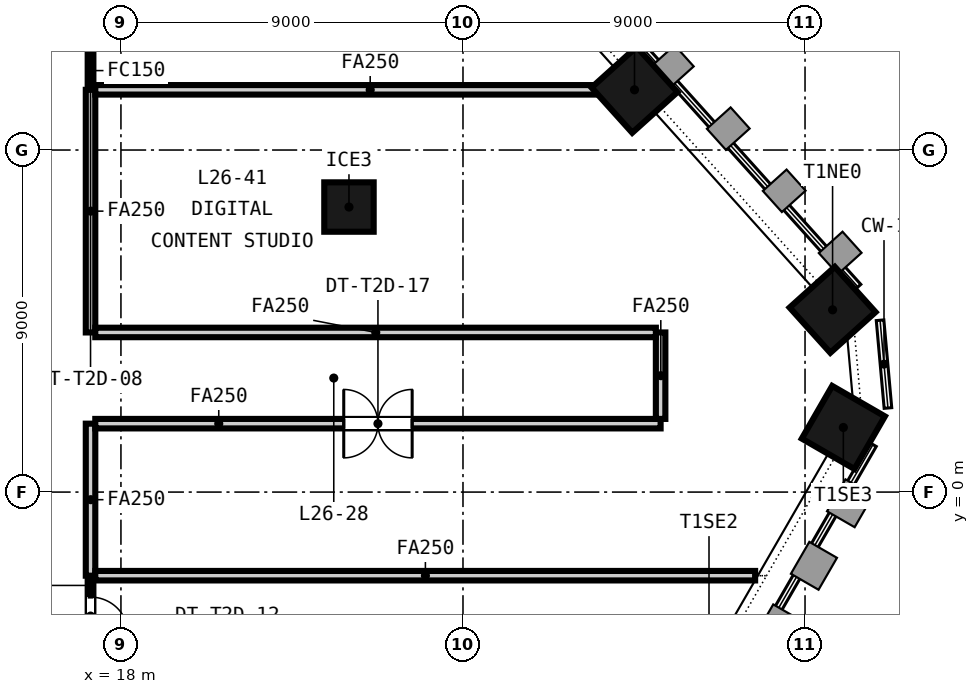
"""IFC4 building model, lengths in metres.
Left out: names, types, materials, properties, quantities, classifications, styles, units other than length and angle.
Written with IfcOpenShell. Run it as: python <this file> out.ifc"""

import sys

from ifc_helpers import new_model, si_unit, direction, frame, frame_2d, origin, origin_2d, place, context, subcontext, project, spatial, rectangle, extrude, element, fill, save


model = new_model("IFC4")
c1 = context("Model", 3, precision=1e-05, world=origin(), true_north=direction((0.0, 1.0)))
c2 = subcontext(c1, "Body", "Model", "MODEL_VIEW")
j1 = project(units=[si_unit("LENGTHUNIT", "METRE"), si_unit("PLANEANGLEUNIT", "RADIAN")], contexts=[c1])
p1 = place(None, origin())
s1 = spatial("IfcSite", under=j1, at=p1, CompositionType="ELEMENT")
p2 = place(p1, origin())
s2 = spatial("IfcBuilding", under=s1, at=p2, CompositionType="ELEMENT")
p3 = place(p2, frame((0.0, 0.0, 109.85)))
s3 = spatial("IfcBuildingStorey", under=s2, at=p3, CompositionType="ELEMENT", Elevation=109.85)
for number, where, z_axis, x_axis in (
    (1, (37.008, 1.7, -0.15), (0.0, 0.0, 1.0), (0.5, 0.866, 0.0)),
    (2, (36.725, 4.795, -0.15), (0.0, 0.0, 1.0), (-0.669, 0.743, 0.0)),
    (3, (31.513, 10.584, -0.15), (0.0, 0.0, 1.0), (-0.669, 0.743, 0.0)),
):
    element("IfcColumn", number, at=place(p3, frame(where, z_axis=z_axis, x_axis=x_axis)), inside=s3, PredefinedType="COLUMN", context=c2, shape_type="SweptSolid", body=[
        extrude(rectangle(XDim=1.6, YDim=1.6, at=origin_2d()), origin(), (0.0, 0.0, 1.0), 3.65),
    ])
p4 = place(p3, frame((24.0, 7.5, -0.15), z_axis=(0.0, 0.0, 1.0), x_axis=(1.0, 0.0, 0.0)))
e4 = element("IfcColumn", 4, at=p4, inside=s3, PredefinedType="COLUMN", context=c2, shape_type="SweptSolid", body=[
    extrude(rectangle(XDim=1.3, YDim=1.3, at=origin_2d()), origin(), (0.0, 0.0, 1.0), 3.65),
])
p5 = place(p3, frame((17.2, 13.709, 0.0), z_axis=(0.0, 0.0, 1.0), x_axis=(0.0, -1.0, 0.0)))
e5 = element("IfcWall", 5, at=p5, inside=s3, PredefinedType="PARTITIONING", context=c2, shape_type="SweptSolid", body=[
    extrude(rectangle(XDim=3.125, YDim=0.15, at=frame_2d((1.562, 0.0))), origin(), (0.0, 0.0, 1.0), 2.741),
])
p6 = place(p5, frame((1.062, 0.0, 0.0)))
e6 = element("IfcOpeningElement", 6, at=p6, cuts=e5, PredefinedType="OPENING", context=c2, shape_type="SweptSolid", body=[
    extrude(rectangle(XDim=1.0, YDim=2.1, at=frame_2d((0.5, 1.05))), frame((0.0, 0.085, 0.0), z_axis=(0.0, -1.0, 0.0), x_axis=(1.0, 0.0, 0.0)), (0.0, 0.0, 1.0), 0.17),
])
p7 = place(p3, frame((17.2, -2.2, 0.0), z_axis=(0.0, 0.0, 1.0), x_axis=(0.0, -1.0, 0.0)))
e7 = element("IfcWall", 7, at=p7, inside=s3, PredefinedType="PARTITIONING", context=c2, shape_type="SweptSolid", body=[
    extrude(rectangle(XDim=2.125, YDim=0.15, at=frame_2d((1.062, 0.0))), origin(), (0.0, 0.0, 1.0), 2.741),
])
p8 = place(p7, frame((0.562, 0.0, 0.0)))
e8 = element("IfcOpeningElement", 8, at=p8, cuts=e7, PredefinedType="OPENING", context=c2, shape_type="SweptSolid", body=[
    extrude(rectangle(XDim=1.0, YDim=2.1, at=frame_2d((0.5, 1.05))), frame((0.0, 0.085, 0.0), z_axis=(0.0, -1.0, 0.0), x_axis=(1.0, 0.0, 0.0)), (0.0, 0.0, 1.0), 0.17),
])
p9 = place(p3, frame((17.2, 1.8, 0.0), z_axis=(0.0, 0.0, 1.0), x_axis=(0.0, -1.0, 0.0)))
e9 = element("IfcWall", 9, at=p9, inside=s3, PredefinedType="PARTITIONING", context=c2, shape_type="SweptSolid", body=[
    extrude(rectangle(XDim=4.0, YDim=0.25, at=frame_2d((2.0, 0.0))), origin(), (0.0, 0.0, 1.0), 2.741),
])
p10 = place(p3, frame((32.2, 1.8, 0.0), z_axis=(0.0, 0.0, 1.0), x_axis=(-1.0, 0.0, 0.0)))
e10 = element("IfcWall", 10, at=p10, inside=s3, PredefinedType="PARTITIONING", context=c2, shape_type="SweptSolid", body=[
    extrude(rectangle(XDim=14.875, YDim=0.25, at=frame_2d((7.438, 0.0))), origin(), (0.0, 0.0, 1.0), 2.741),
])
p11 = place(p10, frame((6.538, 0.0, 0.0)))
e11 = element("IfcOpeningElement", 11, at=p11, cuts=e10, PredefinedType="OPENING", context=c2, shape_type="SweptSolid", body=[
    extrude(rectangle(XDim=1.8, YDim=2.1, at=frame_2d((0.9, 1.05))), frame((0.0, 0.135, 0.0), z_axis=(0.0, -1.0, 0.0), x_axis=(1.0, 0.0, 0.0)), (0.0, 0.0, 1.0), 0.27),
])
p12 = place(p3, frame((32.2, 4.2, 0.0), z_axis=(0.0, 0.0, 1.0), x_axis=(0.0, -1.0, 0.0)))
e12 = element("IfcWall", 12, at=p12, inside=s3, PredefinedType="PARTITIONING", context=c2, shape_type="SweptSolid", body=[
    extrude(rectangle(XDim=2.275, YDim=0.25, at=frame_2d((1.137, 0.0))), origin(), (0.0, 0.0, 1.0), 2.741),
])
p13 = place(p3, frame((17.2, 10.584, 0.0), z_axis=(0.0, 0.0, 1.0), x_axis=(0.0, -1.0, 0.0)))
e13 = element("IfcWall", 13, at=p13, inside=s3, PredefinedType="PARTITIONING", context=c2, shape_type="SweptSolid", body=[
    extrude(rectangle(XDim=6.384, YDim=0.25, at=frame_2d((3.192, 0.0))), origin(), (0.0, 0.0, 1.0), 2.741),
])
p14 = place(p3, frame((17.325, 10.584, 0.0), z_axis=(0.0, 0.0, 1.0), x_axis=(1.0, 0.0, 0.0)))
e14 = element("IfcWall", 14, at=p14, inside=s3, PredefinedType="PARTITIONING", context=c2, shape_type="SweptSolid", body=[
    extrude(rectangle(XDim=14.457, YDim=0.25, at=frame_2d((7.229, 0.0))), origin(), (0.0, 0.0, 1.0), 2.741),
])
p15 = place(p3, frame((17.325, 4.2, 0.0), z_axis=(0.0, 0.0, 1.0), x_axis=(1.0, 0.0, 0.0)))
e15 = element("IfcWall", 15, at=p15, inside=s3, PredefinedType="PARTITIONING", context=c2, shape_type="SweptSolid", body=[
    extrude(rectangle(XDim=14.75, YDim=0.25, at=frame_2d((7.375, 0.0))), origin(), (0.0, 0.0, 1.0), 2.741),
])
p16 = place(p3, frame((17.325, -2.2, 0.0), z_axis=(0.0, 0.0, 1.0), x_axis=(1.0, 0.0, 0.0)))
e16 = element("IfcWall", 16, at=p16, inside=s3, PredefinedType="PARTITIONING", context=c2, shape_type="SweptSolid", body=[
    extrude(rectangle(XDim=17.362, YDim=0.25, at=frame_2d((8.681, 0.0))), origin(), (0.0, 0.0, 1.0), 2.741),
])
p17 = place(p8, origin())
e17 = element("IfcDoor", 17, at=p17, inside=s3, OperationType="SINGLE_SWING_RIGHT", PredefinedType="DOOR", context=c2, shape_type="SweptSolid", body=[
    extrude(rectangle(XDim=1.0, YDim=2.1, at=frame_2d((0.5, 1.05))), frame((0.0, 0.025, 0.0), z_axis=(0.0, -1.0, 0.0), x_axis=(1.0, 0.0, 0.0)), (0.0, 0.0, 1.0), 0.05),
])
fill(e8, e17)
p18 = place(p11, origin())
e18 = element("IfcDoor", 18, at=p18, inside=s3, OperationType="DOUBLE_DOOR_DOUBLE_SWING", PredefinedType="DOOR", context=c2, shape_type="SweptSolid", body=[
    extrude(rectangle(XDim=1.8, YDim=2.1, at=frame_2d((0.9, 1.05))), frame((0.0, 0.025, 0.0), z_axis=(0.0, -1.0, 0.0), x_axis=(1.0, 0.0, 0.0)), (0.0, 0.0, 1.0), 0.05),
])
fill(e11, e18)
save(model, sys.argv[1])
